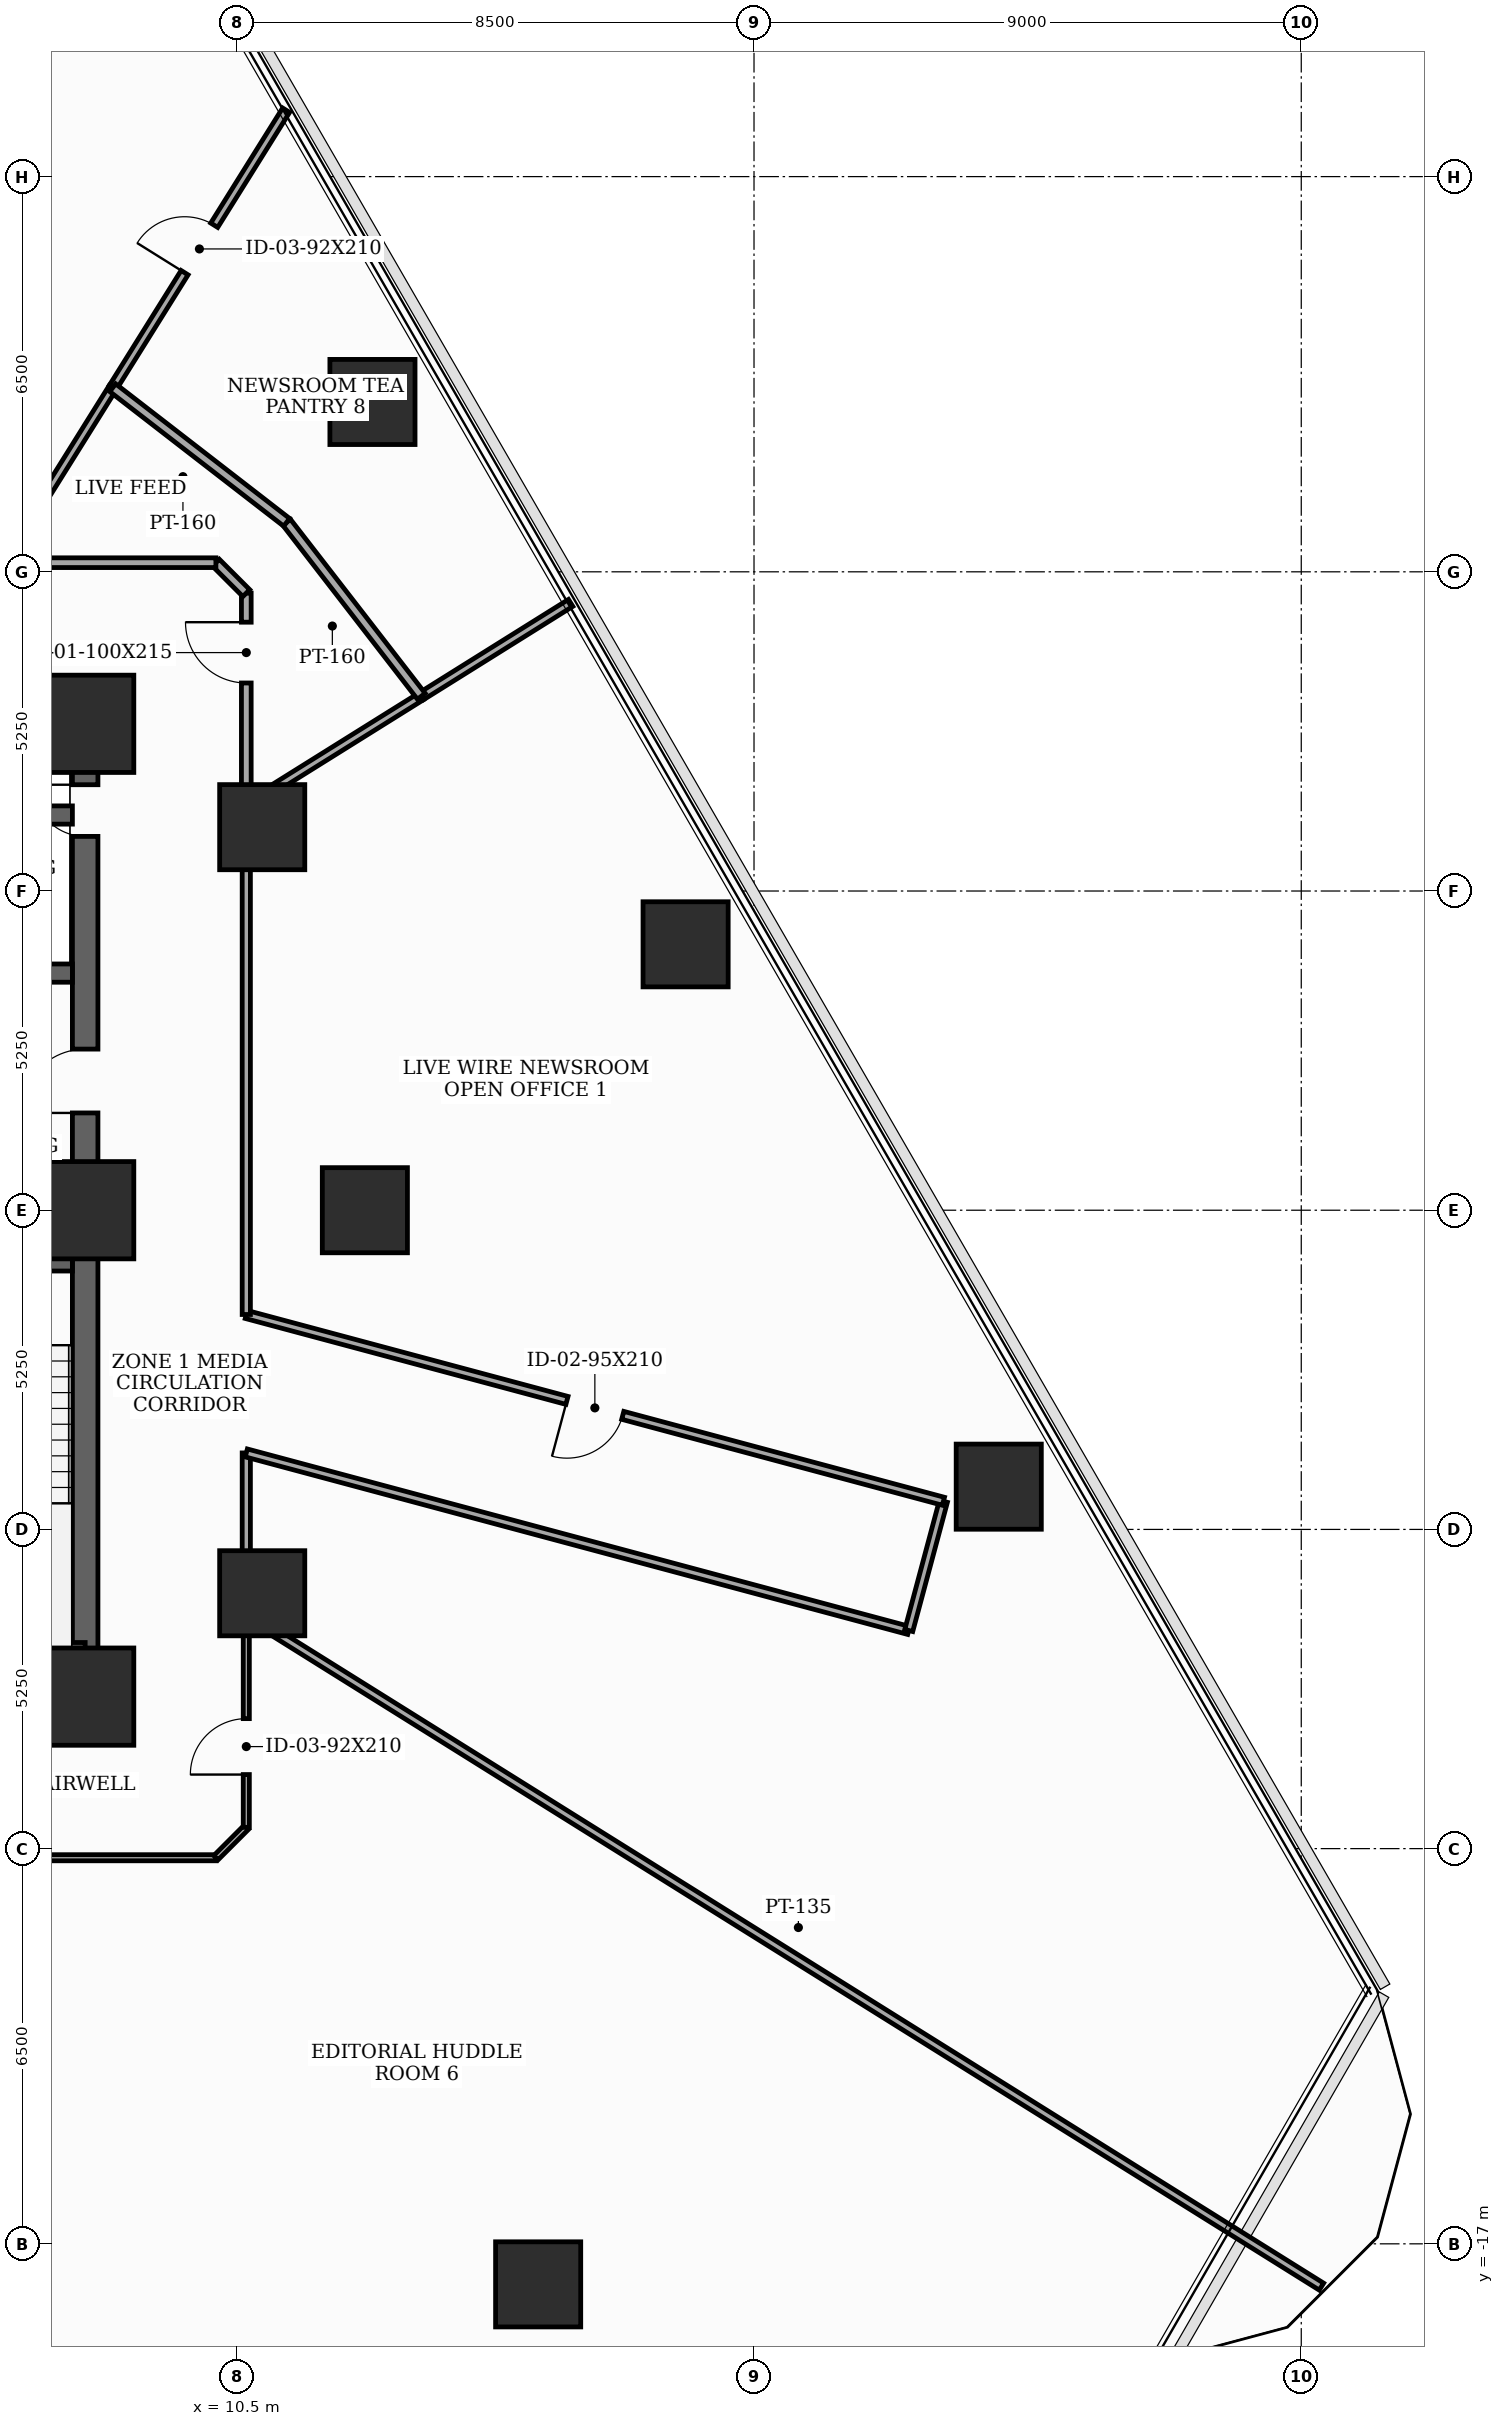
"""IFC4 building model, lengths in metres.
Left out: names, types, materials, properties, quantities, classifications, styles, units other than length and angle.
Written with IfcOpenShell. Run it as: python <this file> out.ifc"""

import sys

from ifc_helpers import new_model, si_unit, direction, frame, frame_2d, origin, origin_2d, place, context, subcontext, project, spatial, rectangle, extrude, element, fill, save


model = new_model("IFC4")
c1 = context("Model", 3, precision=1e-05, world=origin(), true_north=direction((0.0, 1.0)))
c2 = subcontext(c1, "Body", "Model", "MODEL_VIEW")
j1 = project(units=[si_unit("LENGTHUNIT", "METRE"), si_unit("PLANEANGLEUNIT", "RADIAN")], contexts=[c1])
p1 = place(None, origin())
s1 = spatial("IfcSite", under=j1, at=p1, CompositionType="ELEMENT")
p2 = place(p1, origin())
s2 = spatial("IfcBuilding", under=s1, at=p2, CompositionType="ELEMENT")
p3 = place(p2, frame((0.0, 0.0, 33.4)))
s3 = spatial("IfcBuildingStorey", under=s2, at=p3, CompositionType="ELEMENT", Elevation=33.4)
for number, where, z_axis, x_axis in (
    (1, (8.0, -8.0, 0.0), (0.0, 0.0, 1.0), (1.0, 0.0, 0.0)),
    (2, (8.0, 0.0, 0.0), (0.0, 0.0, 1.0), (1.0, 0.0, 0.0)),
    (3, (8.0, 8.0, 0.0), (0.0, 0.0, 1.0), (1.0, 0.0, 0.0)),
):
    element("IfcColumn", number, at=place(p3, frame(where, z_axis=z_axis, x_axis=x_axis)), inside=s3, PredefinedType="COLUMN", context=c2, shape_type="SweptSolid", body=[
        extrude(rectangle(XDim=1.6, YDim=1.6, at=origin_2d()), origin(), (0.0, 0.0, 1.0), 3.7),
    ])
for number, where, z_axis, x_axis in (
    (4, (12.6, 0.0, 0.0), (0.0, 0.0, 1.0), (1.0, 0.0, 0.0)),
    (5, (10.912, 6.3, 0.0), (0.0, 0.0, 1.0), (1.0, 0.0, 0.0)),
    (6, (10.912, -6.3, 0.0), (0.0, 0.0, 1.0), (1.0, 0.0, 0.0)),
    (7, (15.45, -17.667, 0.0), (0.0, 0.0, 1.0), (1.0, 0.0, 0.0)),
    (8, (23.025, -4.547, 0.0), (0.0, 0.0, 1.0), (1.0, 0.0, 0.0)),
    (9, (17.875, 4.373, 0.0), (0.0, 0.0, 1.0), (1.0, 0.0, 0.0)),
    (10, (12.725, 13.293, 0.0), (0.0, 0.0, 1.0), (1.0, 0.0, 0.0)),
):
    element("IfcColumn", number, at=place(p3, frame(where, z_axis=z_axis, x_axis=x_axis)), inside=s3, PredefinedType="COLUMN", context=c2, shape_type="SweptSolid", body=[
        extrude(rectangle(XDim=1.4, YDim=1.4, at=origin_2d()), origin(), (0.0, 0.0, 1.0), 3.7),
    ])
p4 = place(p3, frame((8.0, -8.0, 0.0), z_axis=(0.0, 0.0, 1.0), x_axis=(0.0, 1.0, 0.0)))
e11 = element("IfcWall", 11, at=p4, inside=s3, PredefinedType="SHEAR", context=c2, shape_type="SweptSolid", body=[
    extrude(rectangle(XDim=16.0, YDim=0.42, at=frame_2d((8.0, 0.0))), origin(), (0.0, 0.0, 1.0), 3.5),
])
p5 = place(p4, frame((9.6, 0.0, 0.0)))
e12 = element("IfcOpeningElement", 12, at=p5, cuts=e11, PredefinedType="OPENING", context=c2, shape_type="SweptSolid", body=[
    extrude(rectangle(XDim=1.05, YDim=2.15, at=frame_2d((0.525, 1.075))), frame((0.0, 0.22, 0.0), z_axis=(0.0, -1.0, 0.0), x_axis=(1.0, 0.0, 0.0)), (0.0, 0.0, 1.0), 0.44),
])
p6 = place(p4, frame((14.148, 0.0, 0.0)))
e13 = element("IfcOpeningElement", 13, at=p6, cuts=e11, PredefinedType="OPENING", context=c2, shape_type="SweptSolid", body=[
    extrude(rectangle(XDim=0.85, YDim=2.02, at=frame_2d((0.425, 1.01))), frame((0.0, 0.22, 0.0), z_axis=(0.0, -1.0, 0.0), x_axis=(1.0, 0.0, 0.0)), (0.0, 0.0, 1.0), 0.44),
])
p7 = place(p3, frame((-8.0, -8.0, 0.0), z_axis=(0.0, 0.0, 1.0), x_axis=(1.0, 0.0, 0.0)))
e14 = element("IfcWall", 14, at=p7, inside=s3, PredefinedType="SHEAR", context=c2, shape_type="SweptSolid", body=[
    extrude(rectangle(XDim=16.0, YDim=0.42, at=frame_2d((8.0, 0.0))), origin(), (0.0, 0.0, 1.0), 3.5),
])
p8 = place(p7, frame((5.2, 0.0, 0.0)))
e15 = element("IfcOpeningElement", 15, at=p8, cuts=e14, PredefinedType="OPENING", context=c2, shape_type="SweptSolid", body=[
    extrude(rectangle(XDim=0.95, YDim=2.1, at=frame_2d((0.475, 1.05))), frame((0.0, 0.22, 0.0), z_axis=(0.0, -1.0, 0.0), x_axis=(1.0, 0.0, 0.0)), (0.0, 0.0, 1.0), 0.44),
])
p9 = place(p7, frame((9.8, 0.0, 0.0)))
e16 = element("IfcOpeningElement", 16, at=p9, cuts=e14, PredefinedType="OPENING", context=c2, shape_type="SweptSolid", body=[
    extrude(rectangle(XDim=0.95, YDim=2.1, at=frame_2d((0.475, 1.05))), frame((0.0, 0.22, 0.0), z_axis=(0.0, -1.0, 0.0), x_axis=(1.0, 0.0, 0.0)), (0.0, 0.0, 1.0), 0.44),
])
p10 = place(p3, frame((-8.0, 8.0, 0.0), z_axis=(0.0, 0.0, 1.0), x_axis=(1.0, 0.0, 0.0)))
e17 = element("IfcWall", 17, at=p10, inside=s3, PredefinedType="SHEAR", context=c2, shape_type="SweptSolid", body=[
    extrude(rectangle(XDim=16.0, YDim=0.42, at=frame_2d((8.0, 0.0))), origin(), (0.0, 0.0, 1.0), 3.5),
])
p11 = place(p10, frame((7.1, 0.0, 0.0)))
e18 = element("IfcOpeningElement", 18, at=p11, cuts=e17, PredefinedType="OPENING", context=c2, shape_type="SweptSolid", body=[
    extrude(rectangle(XDim=1.8, YDim=2.15, at=frame_2d((0.9, 1.075))), frame((0.0, 0.22, 0.0), z_axis=(0.0, -1.0, 0.0), x_axis=(1.0, 0.0, 0.0)), (0.0, 0.0, 1.0), 0.44),
])
p12 = place(p3, frame((4.45, -0.85, 0.0), z_axis=(0.0, 0.0, 1.0), x_axis=(1.0, 0.0, 0.0)))
e19 = element("IfcWall", 19, at=p12, inside=s3, PredefinedType="SHEAR", context=c2, shape_type="SweptSolid", body=[
    extrude(rectangle(XDim=3.34, YDim=0.3, at=frame_2d((1.67, 0.0))), origin(), (0.0, 0.0, 1.0), 3.5),
])
p13 = place(p12, frame((0.65, 0.0, 0.0)))
e20 = element("IfcOpeningElement", 20, at=p13, cuts=e19, PredefinedType="OPENING", context=c2, shape_type="SweptSolid", body=[
    extrude(rectangle(XDim=1.05, YDim=2.15, at=frame_2d((0.525, 1.075))), frame((0.0, 0.16, 0.0), z_axis=(0.0, -1.0, 0.0), x_axis=(1.0, 0.0, 0.0)), (0.0, 0.0, 1.0), 0.32),
])
p14 = place(p3, frame((4.45, -7.26, 0.0), z_axis=(0.0, 0.0, 1.0), x_axis=(1.0, 0.0, 0.0)))
e21 = element("IfcWall", 21, at=p14, inside=s3, PredefinedType="SHEAR", context=c2, shape_type="SweptSolid", body=[
    extrude(rectangle(XDim=3.55, YDim=0.3, at=frame_2d((1.775, 0.0))), origin(), (0.0, 0.0, 1.0), 3.5),
])
p15 = place(p3, frame((4.45, 3.9, 0.0), z_axis=(0.0, 0.0, 1.0), x_axis=(1.0, 0.0, 0.0)))
e22 = element("IfcWall", 22, at=p15, inside=s3, PredefinedType="SHEAR", context=c2, shape_type="SweptSolid", body=[
    extrude(rectangle(XDim=3.34, YDim=0.3, at=frame_2d((1.67, 0.0))), origin(), (0.0, 0.0, 1.0), 3.5),
])
p16 = place(p15, frame((1.18, 0.0, 0.0)))
e23 = element("IfcOpeningElement", 23, at=p16, cuts=e22, PredefinedType="OPENING", context=c2, shape_type="SweptSolid", body=[
    extrude(rectangle(XDim=1.1, YDim=2.1, at=frame_2d((0.55, 1.05))), frame((0.0, 0.16, 0.0), z_axis=(0.0, -1.0, 0.0), x_axis=(1.0, 0.0, 0.0)), (0.0, 0.0, 1.0), 0.32),
])
p17 = place(p3, frame((4.45, 6.5, 0.0), z_axis=(0.0, 0.0, 1.0), x_axis=(1.0, 0.0, 0.0)))
e24 = element("IfcWall", 24, at=p17, inside=s3, PredefinedType="SHEAR", context=c2, shape_type="SweptSolid", body=[
    extrude(rectangle(XDim=3.34, YDim=0.3, at=frame_2d((1.67, 0.0))), origin(), (0.0, 0.0, 1.0), 3.5),
])
p18 = place(p3, frame((10.65, -6.655, 0.0), z_axis=(0.0, 0.0, 1.0), x_axis=(0.0, 1.0, 0.0)))
e25 = element("IfcWall", 25, at=p18, inside=s3, PredefinedType="PARTITIONING", context=c2, shape_type="SweptSolid", body=[
    extrude(rectangle(XDim=2.663, YDim=0.135, at=frame_2d((1.332, 0.0))), origin(), (0.0, 0.0, 1.0), 2.785),
])
p19 = place(p3, frame((10.65, -3.992, 0.0), z_axis=(0.0, 0.0, 1.0), x_axis=(0.965906888357, -0.258889712088, 0.0)))
e26 = element("IfcWall", 26, at=p19, inside=s3, PredefinedType="PARTITIONING", context=c2, shape_type="SweptSolid", body=[
    extrude(rectangle(XDim=11.28, YDim=0.135, at=frame_2d((5.64, 0.0))), origin(), (0.0, 0.0, 1.0), 2.785),
])
p20 = place(p3, frame((21.545, -6.912, 0.0), z_axis=(0.0, 0.0, 1.0), x_axis=(0.259105843213, 0.965848933329, 0.0)))
e27 = element("IfcWall", 27, at=p20, inside=s3, PredefinedType="PARTITIONING", context=c2, shape_type="SweptSolid", body=[
    extrude(rectangle(XDim=2.2, YDim=0.135, at=frame_2d((1.1, 0.0))), origin(), (0.0, 0.0, 1.0), 2.935),
])
p21 = place(p3, frame((22.115, -4.787, 0.0), z_axis=(0.0, 0.0, 1.0), x_axis=(-0.965926659449, 0.258815935688, 0.0)))
e28 = element("IfcWall", 28, at=p21, inside=s3, PredefinedType="PARTITIONING", context=c2, shape_type="SweptSolid", body=[
    extrude(rectangle(XDim=11.87, YDim=0.135, at=frame_2d((5.935, 0.0))), origin(), (0.0, 0.0, 1.0), 2.785),
])
p22 = place(p21, frame((5.46, 0.0, 0.0)))
e29 = element("IfcOpeningElement", 29, at=p22, cuts=e28, PredefinedType="OPENING", context=c2, shape_type="SweptSolid", body=[
    extrude(rectangle(XDim=0.95, YDim=2.1, at=frame_2d((0.475, 1.05))), frame((0.0, 0.077, 0.0), z_axis=(0.0, -1.0, 0.0), x_axis=(1.0, 0.0, 0.0)), (0.0, 0.0, 1.0), 0.155),
])
p23 = place(p3, frame((10.65, -1.715, 0.0), z_axis=(0.0, 0.0, 1.0), x_axis=(0.0, 1.0, 0.0)))
e30 = element("IfcWall", 30, at=p23, inside=s3, PredefinedType="PARTITIONING", context=c2, shape_type="SweptSolid", body=[
    extrude(rectangle(XDim=8.37, YDim=0.135, at=frame_2d((4.185, 0.0))), origin(), (0.0, 0.0, 1.0), 2.785),
])
p24 = place(p3, frame((2.45, -10.65, 0.0), z_axis=(0.0, 0.0, 1.0), x_axis=(1.0, 0.0, 0.0)))
e31 = element("IfcWall", 31, at=p24, inside=s3, PredefinedType="MOVABLE", context=c2, shape_type="SweptSolid", body=[
    extrude(rectangle(XDim=7.7, YDim=0.1, at=frame_2d((3.85, 0.0))), origin(), (0.0, 0.0, 1.0), 2.785),
])
p25 = place(p3, frame((10.15, -10.65, 0.0), z_axis=(0.0, 0.0, 1.0), x_axis=(0.707106781187, 0.707106781187, 0.0)))
e32 = element("IfcWall", 32, at=p25, inside=s3, PredefinedType="MOVABLE", context=c2, shape_type="SweptSolid", body=[
    extrude(rectangle(XDim=0.707, YDim=0.1, at=frame_2d((0.354, 0.0))), origin(), (0.0, 0.0, 1.0), 3.5),
])
p26 = place(p3, frame((10.65, -10.15, 0.0), z_axis=(0.0, 0.0, 1.0), x_axis=(0.0, 1.0, 0.0)))
e33 = element("IfcWall", 33, at=p26, inside=s3, PredefinedType="MOVABLE", context=c2, shape_type="SweptSolid", body=[
    extrude(rectangle(XDim=3.495, YDim=0.1, at=frame_2d((1.748, 0.0))), origin(), (0.0, 0.0, 1.0), 2.785),
])
p27 = place(p26, frame((0.868, 0.0, 0.0)))
e34 = element("IfcOpeningElement", 34, at=p27, cuts=e33, PredefinedType="OPENING", context=c2, shape_type="SweptSolid", body=[
    extrude(rectangle(XDim=0.92, YDim=2.1, at=frame_2d((0.46, 1.05))), frame((0.0, 0.06, 0.0), z_axis=(0.0, -1.0, 0.0), x_axis=(1.0, 0.0, 0.0)), (0.0, 0.0, 1.0), 0.12),
])
p28 = place(p3, frame((10.65, 6.655, 0.0), z_axis=(0.0, 0.0, 1.0), x_axis=(0.0, 1.0, 0.0)))
e35 = element("IfcWall", 35, at=p28, inside=s3, PredefinedType="PARTITIONING", context=c2, shape_type="SweptSolid", body=[
    extrude(rectangle(XDim=3.495, YDim=0.16, at=frame_2d((1.748, 0.0))), origin(), (0.0, 0.0, 1.0), 2.785),
])
p29 = place(p28, frame((2.016, 0.0, 0.0)))
e36 = element("IfcOpeningElement", 36, at=p29, cuts=e35, PredefinedType="OPENING", context=c2, shape_type="SweptSolid", body=[
    extrude(rectangle(XDim=1.0, YDim=2.15, at=frame_2d((0.5, 1.075))), frame((0.0, 0.09, 0.0), z_axis=(0.0, -1.0, 0.0), x_axis=(1.0, 0.0, 0.0)), (0.0, 0.0, 1.0), 0.18),
])
p30 = place(p3, frame((10.65, 10.15, 0.0), z_axis=(0.0, 0.0, 1.0), x_axis=(-0.707106781187, 0.707106781187, 0.0)))
e37 = element("IfcWall", 37, at=p30, inside=s3, PredefinedType="PARTITIONING", context=c2, shape_type="SweptSolid", body=[
    extrude(rectangle(XDim=0.707, YDim=0.16, at=frame_2d((0.354, 0.0))), origin(), (0.0, 0.0, 1.0), 3.5),
])
p31 = place(p3, frame((10.15, 10.65, 0.0), z_axis=(0.0, 0.0, 1.0), x_axis=(-1.0, 0.0, 0.0)))
e38 = element("IfcWall", 38, at=p31, inside=s3, PredefinedType="PARTITIONING", context=c2, shape_type="SweptSolid", body=[
    extrude(rectangle(XDim=3.495, YDim=0.16, at=frame_2d((1.748, 0.0))), origin(), (0.0, 0.0, 1.0), 2.785),
])
p32 = place(p3, frame((10.65, -6.655, 0.0), z_axis=(0.0, 0.0, 1.0), x_axis=(0.848052240981, -0.529912631069, 0.0)))
e39 = element("IfcWall", 39, at=p32, inside=s3, PredefinedType="PARTITIONING", context=c2, shape_type="SweptSolid", body=[
    extrude(rectangle(XDim=20.85, YDim=0.135, at=frame_2d((10.425, 0.0))), origin(), (0.0, 0.0, 1.0), 2.785),
])
p33 = place(p3, frame((13.528, 8.453, 0.0), z_axis=(0.0, 0.0, 1.0), x_axis=(-0.848131653937, -0.529785520366, 0.0)))
e40 = element("IfcWall", 40, at=p33, inside=s3, PredefinedType="PARTITIONING", context=c2, shape_type="SweptSolid", body=[
    extrude(rectangle(XDim=3.394, YDim=0.135, at=frame_2d((1.697, 0.0))), origin(), (0.0, 0.0, 1.0), 2.785),
])
p34 = place(p3, frame((15.984, 9.988, 0.0), z_axis=(0.0, 0.0, 1.0), x_axis=(-0.847941475479, -0.5300898548, 0.0)))
e41 = element("IfcWall", 41, at=p34, inside=s3, PredefinedType="PARTITIONING", context=c2, shape_type="SweptSolid", body=[
    extrude(rectangle(XDim=2.896, YDim=0.135, at=frame_2d((1.448, 0.0))), origin(), (0.0, 0.0, 1.0), 2.935),
])
p35 = place(p3, frame((6.655, 10.65, 0.0), z_axis=(0.0, 0.0, 1.0), x_axis=(0.529785520366, 0.848131653937, 0.0)))
e42 = element("IfcWall", 42, at=p35, inside=s3, PredefinedType="PARTITIONING", context=c2, shape_type="SweptSolid", body=[
    extrude(rectangle(XDim=3.394, YDim=0.135, at=frame_2d((1.697, 0.0))), origin(), (0.0, 0.0, 1.0), 2.685),
])
p36 = place(p3, frame((8.453, 13.528, 0.0), z_axis=(0.0, 0.0, 1.0), x_axis=(0.529933702465, 0.848039073977, 0.0)))
e43 = element("IfcWall", 43, at=p36, inside=s3, PredefinedType="PARTITIONING", context=c2, shape_type="SweptSolid", body=[
    extrude(rectangle(XDim=5.382, YDim=0.135, at=frame_2d((2.691, 0.0))), origin(), (0.0, 0.0, 1.0), 2.935),
])
p37 = place(p36, frame((2.231, 0.0, 0.0)))
e44 = element("IfcOpeningElement", 44, at=p37, cuts=e43, PredefinedType="OPENING", context=c2, shape_type="SweptSolid", body=[
    extrude(rectangle(XDim=0.92, YDim=2.1, at=frame_2d((0.46, 1.05))), frame((0.0, 0.077, 0.0), z_axis=(0.0, -1.0, 0.0), x_axis=(1.0, 0.0, 0.0)), (0.0, 0.0, 1.0), 0.155),
])
p38 = place(p3, frame((13.528, 8.453, 0.0), z_axis=(0.0, 0.0, 1.0), x_axis=(-0.612013931987, 0.790846980809, 0.0)))
e45 = element("IfcWall", 45, at=p38, inside=s3, PredefinedType="PARTITIONING", context=c2, shape_type="SweptSolid", body=[
    extrude(rectangle(XDim=3.618, YDim=0.16, at=frame_2d((1.809, 0.0))), origin(), (0.0, 0.0, 1.0), 3.5),
])
p39 = place(p3, frame((11.314, 11.314, 0.0), z_axis=(0.0, 0.0, 1.0), x_axis=(-0.790846980809, 0.612013931987, 0.0)))
e46 = element("IfcWall", 46, at=p39, inside=s3, PredefinedType="PARTITIONING", context=c2, shape_type="SweptSolid", body=[
    extrude(rectangle(XDim=3.618, YDim=0.16, at=frame_2d((1.809, 0.0))), origin(), (0.0, 0.0, 1.0), 2.685),
])
p40 = place(p5, origin())
e47 = element("IfcDoor", 47, at=p40, inside=s3, OperationType="SINGLE_SWING_LEFT", PredefinedType="DOOR", context=c2, shape_type="SweptSolid", body=[
    extrude(rectangle(XDim=1.05, YDim=2.15, at=frame_2d((0.525, 1.075))), frame((0.0, 0.025, 0.0), z_axis=(0.0, -1.0, 0.0), x_axis=(1.0, 0.0, 0.0)), (0.0, 0.0, 1.0), 0.05),
])
fill(e12, e47)
p41 = place(p6, origin())
e48 = element("IfcDoor", 48, at=p41, inside=s3, OperationType="SINGLE_SWING_RIGHT", PredefinedType="TRAPDOOR", context=c2, shape_type="SweptSolid", body=[
    extrude(rectangle(XDim=0.85, YDim=2.02, at=frame_2d((0.425, 1.01))), frame((0.0, 0.025, 0.0), z_axis=(0.0, -1.0, 0.0), x_axis=(1.0, 0.0, 0.0)), (0.0, 0.0, 1.0), 0.05),
])
fill(e13, e48)
p42 = place(p22, origin())
e49 = element("IfcDoor", 49, at=p42, inside=s3, OperationType="SINGLE_SWING_RIGHT", PredefinedType="DOOR", context=c2, shape_type="SweptSolid", body=[
    extrude(rectangle(XDim=0.95, YDim=2.1, at=frame_2d((0.475, 1.05))), frame((0.0, 0.025, 0.0), z_axis=(0.0, -1.0, 0.0), x_axis=(1.0, 0.0, 0.0)), (0.0, 0.0, 1.0), 0.05),
])
fill(e29, e49)
p43 = place(p27, origin())
e50 = element("IfcDoor", 50, at=p43, inside=s3, OperationType="SINGLE_SWING_LEFT", PredefinedType="DOOR", context=c2, shape_type="SweptSolid", body=[
    extrude(rectangle(XDim=0.92, YDim=2.1, at=frame_2d((0.46, 1.05))), frame((0.0, 0.025, 0.0), z_axis=(0.0, -1.0, 0.0), x_axis=(1.0, 0.0, 0.0)), (0.0, 0.0, 1.0), 0.05),
])
fill(e34, e50)
p44 = place(p29, origin())
e51 = element("IfcDoor", 51, at=p44, inside=s3, OperationType="SINGLE_SWING_RIGHT", PredefinedType="DOOR", context=c2, shape_type="SweptSolid", body=[
    extrude(rectangle(XDim=1.0, YDim=2.15, at=frame_2d((0.5, 1.075))), frame((0.0, 0.025, 0.0), z_axis=(0.0, -1.0, 0.0), x_axis=(1.0, 0.0, 0.0)), (0.0, 0.0, 1.0), 0.05),
])
fill(e36, e51)
p45 = place(p37, origin())
e52 = element("IfcDoor", 52, at=p45, inside=s3, OperationType="SINGLE_SWING_LEFT", PredefinedType="DOOR", context=c2, shape_type="SweptSolid", body=[
    extrude(rectangle(XDim=0.92, YDim=2.1, at=frame_2d((0.46, 1.05))), frame((0.0, 0.025, 0.0), z_axis=(0.0, -1.0, 0.0), x_axis=(1.0, 0.0, 0.0)), (0.0, 0.0, 1.0), 0.05),
])
fill(e44, e52)
save(model, sys.argv[1])
